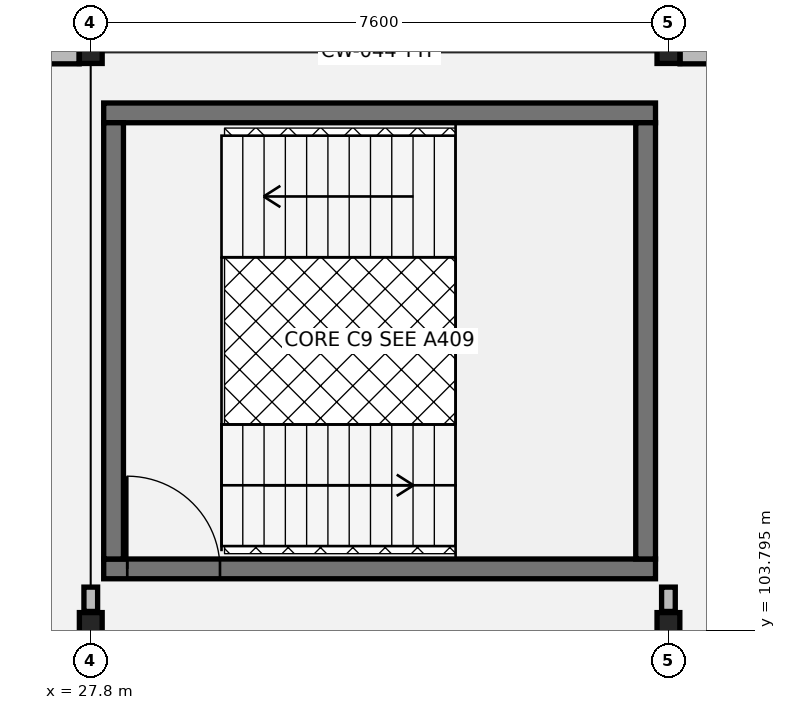
"""IFC4 building model, lengths in metres.
Left out: names, types, materials, properties, quantities, classifications, styles, units other than length and angle.
Written with IfcOpenShell. Run it as: python <this file> out.ifc"""

import sys

from ifc_helpers import new_model, si_unit, direction, frame, frame_2d, origin, origin_2d, place, context, subcontext, project, spatial, rectangle, hollow_rectangle, i_section, extrude, element, fill, save


model = new_model("IFC4")
c1 = context("Model", 3, precision=1e-05, world=origin(), true_north=direction((0.0, 1.0)))
c2 = subcontext(c1, "Body", "Model", "MODEL_VIEW")
j1 = project(units=[si_unit("LENGTHUNIT", "METRE"), si_unit("PLANEANGLEUNIT", "RADIAN")], contexts=[c1])
p1 = place(None, origin())
s1 = spatial("IfcSite", under=j1, at=p1, CompositionType="ELEMENT")
p2 = place(p1, origin())
s2 = spatial("IfcBuilding", under=s1, at=p2, CompositionType="ELEMENT")
p3 = place(p2, frame((0.0, 0.0, 5.1)))
s3 = spatial("IfcBuildingStorey", under=s2, at=p3, CompositionType="ELEMENT", Elevation=5.1)
p4 = place(p3, frame((27.8, 103.8, 0.0), z_axis=(0.0, 0.0, 1.0), x_axis=(1.0, 0.0, 0.0)))
e1 = element("IfcColumn", 1, at=p4, inside=s3, PredefinedType="COLUMN", context=c2, shape_type="SweptSolid", body=[
    extrude(i_section(OverallWidth=0.3, OverallDepth=0.45, WebThickness=0.014, FlangeThickness=0.026, at=origin_2d()), origin(), (0.0, 0.0, 1.0), 4.055),
])
p5 = place(p3, frame((27.8, 111.4, 0.0), z_axis=(0.0, 0.0, 1.0), x_axis=(1.0, 0.0, 0.0)))
e2 = element("IfcColumn", 2, at=p5, inside=s3, PredefinedType="COLUMN", context=c2, shape_type="SweptSolid", body=[
    extrude(hollow_rectangle(XDim=0.3, YDim=0.3, WallThickness=0.012, at=origin_2d()), origin(), (0.0, 0.0, 1.0), 4.055),
])
p6 = place(p3, frame((35.4, 103.8, 0.0), z_axis=(0.0, 0.0, 1.0), x_axis=(1.0, 0.0, 0.0)))
e3 = element("IfcColumn", 3, at=p6, inside=s3, PredefinedType="COLUMN", context=c2, shape_type="SweptSolid", body=[
    extrude(i_section(OverallWidth=0.3, OverallDepth=0.45, WebThickness=0.014, FlangeThickness=0.026, at=origin_2d()), origin(), (0.0, 0.0, 1.0), 4.055),
])
p7 = place(p3, frame((35.4, 111.4, 0.0), z_axis=(0.0, 0.0, 1.0), x_axis=(1.0, 0.0, 0.0)))
e4 = element("IfcColumn", 4, at=p7, inside=s3, PredefinedType="COLUMN", context=c2, shape_type="SweptSolid", body=[
    extrude(hollow_rectangle(XDim=0.3, YDim=0.3, WallThickness=0.012, at=origin_2d()), origin(), (0.0, 0.0, 1.0), 4.055),
])
p8 = place(p3, frame((42.847, 111.4, 0.0), z_axis=(0.0, 0.0, 1.0), x_axis=(-1.0, 0.0, 0.0)))
e5 = element("IfcWall", 5, at=p8, inside=s3, PredefinedType="SOLIDWALL", context=c2, shape_type="SweptSolid", body=[
    extrude(rectangle(XDim=7.294, YDim=0.31, at=frame_2d((3.647, 0.0))), origin(), (0.0, 0.0, 1.0), 3.48),
])
p9 = place(p8, frame((3.097, 0.0, 0.8)))
e6 = element("IfcOpeningElement", 6, at=p9, cuts=e5, PredefinedType="OPENING", context=c2, shape_type="SweptSolid", body=[
    extrude(rectangle(XDim=1.1, YDim=2.05, at=frame_2d((0.55, 1.025))), frame((0.0, 0.165, 0.0), z_axis=(0.0, -1.0, 0.0), x_axis=(1.0, 0.0, 0.0)), (0.0, 0.0, 1.0), 0.33),
])
p10 = place(p3, frame((27.647, 111.4, 0.0), z_axis=(0.0, 0.0, 1.0), x_axis=(-1.0, 0.0, 0.0)))
e7 = element("IfcWall", 7, at=p10, inside=s3, PredefinedType="SOLIDWALL", context=c2, shape_type="SweptSolid", body=[
    extrude(rectangle(XDim=7.294, YDim=0.31, at=frame_2d((3.647, 0.0))), origin(), (0.0, 0.0, 1.0), 3.48),
])
p11 = place(p10, frame((2.997, 0.0, 0.8)))
e8 = element("IfcOpeningElement", 8, at=p11, cuts=e7, PredefinedType="OPENING", context=c2, shape_type="SweptSolid", body=[
    extrude(rectangle(XDim=1.3, YDim=2.12, at=frame_2d((0.65, 1.06))), frame((0.0, 0.165, 0.0), z_axis=(0.0, -1.0, 0.0), x_axis=(1.0, 0.0, 0.0)), (0.0, 0.0, 1.0), 0.33),
])
p12 = place(p3, frame((27.97, 104.6, 0.0), z_axis=(0.0, 0.0, 1.0), x_axis=(1.0, 0.0, 0.0)))
e9 = element("IfcWall", 9, at=p12, inside=s3, PredefinedType="SHEAR", context=c2, shape_type="SweptSolid", body=[
    extrude(rectangle(XDim=7.26, YDim=0.26, at=frame_2d((3.63, 0.0))), origin(), (0.0, 0.0, 1.0), 3.845),
])
p13 = place(p12, frame((0.31, 0.0, 0.0)))
e10 = element("IfcOpeningElement", 10, at=p13, cuts=e9, PredefinedType="OPENING", context=c2, shape_type="SweptSolid", body=[
    extrude(rectangle(XDim=1.22, YDim=2.18, at=frame_2d((0.61, 1.09))), frame((0.0, 0.14, 0.0), z_axis=(0.0, -1.0, 0.0), x_axis=(1.0, 0.0, 0.0)), (0.0, 0.0, 1.0), 0.28),
])
p14 = place(p3, frame((27.97, 110.6, 0.0), z_axis=(0.0, 0.0, 1.0), x_axis=(1.0, 0.0, 0.0)))
e11 = element("IfcWall", 11, at=p14, inside=s3, PredefinedType="SHEAR", context=c2, shape_type="SweptSolid", body=[
    extrude(rectangle(XDim=7.26, YDim=0.26, at=frame_2d((3.63, 0.0))), origin(), (0.0, 0.0, 1.0), 3.845),
])
for number, where, z_axis, x_axis in (
    (12, (28.1, 104.73, 0.0), (0.0, 0.0, 1.0), (0.0, 1.0, 0.0)),
    (13, (35.1, 104.73, 0.0), (0.0, 0.0, 1.0), (0.0, 1.0, 0.0)),
):
    element("IfcWall", number, at=place(p3, frame(where, z_axis=z_axis, x_axis=x_axis)), inside=s3, PredefinedType="SHEAR", context=c2, shape_type="SweptSolid", body=[
        extrude(rectangle(XDim=5.74, YDim=0.26, at=frame_2d((2.87, 0.0))), origin(), (0.0, 0.0, 1.0), 3.845),
    ])
for number, where, z_axis, x_axis in (
    (14, (27.8, 104.04, 0.0), (0.0, 0.0, 1.0), (0.0, 1.0, 0.0)),
    (15, (35.4, 104.04, 0.0), (0.0, 0.0, 1.0), (0.0, 1.0, 0.0)),
):
    element("IfcWall", number, at=place(p3, frame(where, z_axis=z_axis, x_axis=x_axis)), inside=s3, PredefinedType="PARTITIONING", context=c2, shape_type="SweptSolid", body=[
        extrude(rectangle(XDim=0.32, YDim=0.18, at=frame_2d((0.16, 0.0))), origin(), (0.0, 0.0, 1.0), 3.18),
    ])
p15 = place(p13, origin())
e16 = element("IfcDoor", 16, at=p15, inside=s3, OperationType="SINGLE_SWING_LEFT", PredefinedType="DOOR", context=c2, shape_type="SweptSolid", body=[
    extrude(rectangle(XDim=1.22, YDim=2.18, at=frame_2d((0.61, 1.09))), frame((0.0, 0.025, 0.0), z_axis=(0.0, -1.0, 0.0), x_axis=(1.0, 0.0, 0.0)), (0.0, 0.0, 1.0), 0.05),
])
fill(e10, e16)
save(model, sys.argv[1])
